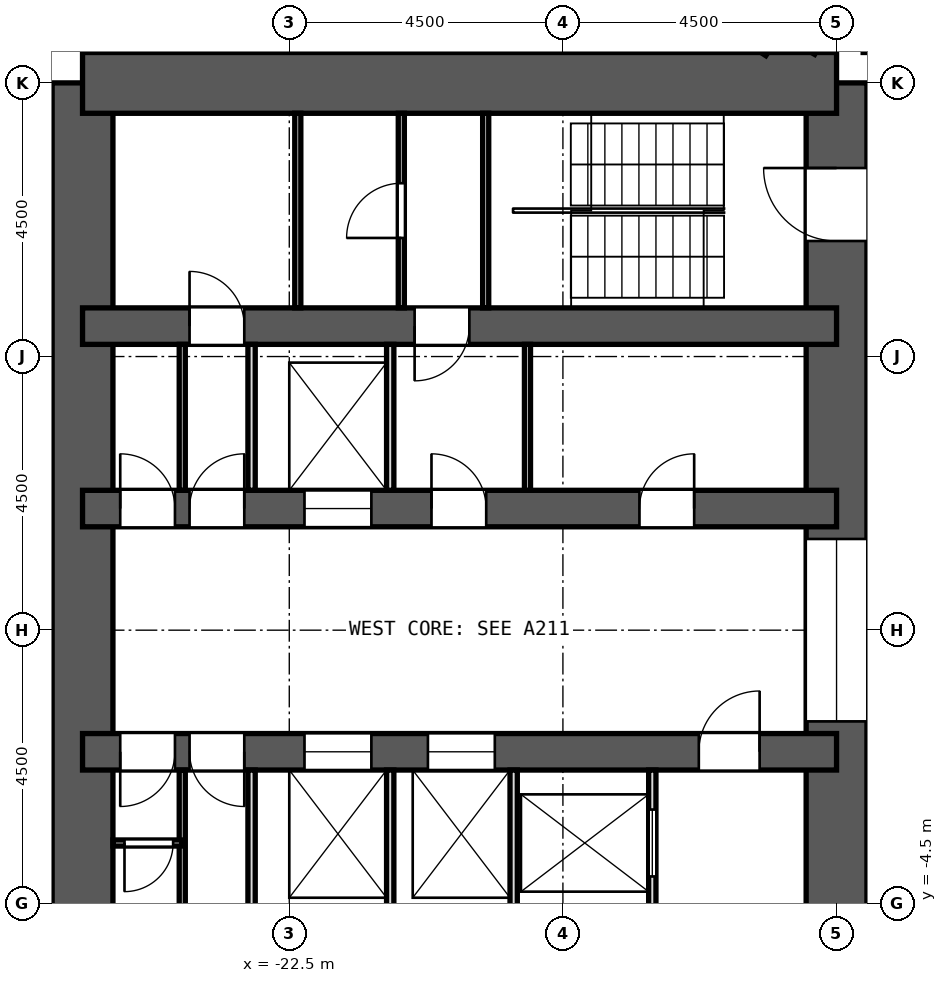
"""IFC4 building model, lengths in metres.
Left out: names, types, materials, properties, quantities, classifications, styles, units other than length and angle.
Written with IfcOpenShell. Run it as: python <this file> out.ifc"""

import sys

from ifc_helpers import new_model, si_unit, direction, frame, frame_2d, origin, place, context, subcontext, project, spatial, rectangle, extrude, element, fill, save


model = new_model("IFC4")
c1 = context("Model", 3, precision=1e-05, world=origin(), true_north=direction((0.0, 1.0)))
c2 = subcontext(c1, "Body", "Model", "MODEL_VIEW")
j1 = project(units=[si_unit("LENGTHUNIT", "METRE"), si_unit("PLANEANGLEUNIT", "RADIAN")], contexts=[c1])
p1 = place(None, origin())
s1 = spatial("IfcSite", under=j1, at=p1, CompositionType="ELEMENT")
p2 = place(p1, origin())
s2 = spatial("IfcBuilding", under=s1, at=p2, CompositionType="ELEMENT")
p3 = place(p2, frame((0.0, 0.0, 46.1)))
s3 = spatial("IfcBuildingStorey", under=s2, at=p3, CompositionType="ELEMENT", Elevation=46.1)
p4 = place(p3, frame((-13.5, -9.0, 0.0), z_axis=(0.0, 0.0, 1.0), x_axis=(0.0, 1.0, 0.0)))
e1 = element("IfcWall", 1, at=p4, inside=s3, PredefinedType="SHEAR", context=c2, shape_type="SweptSolid", body=[
    extrude(rectangle(XDim=18.0, YDim=1.0, at=frame_2d((9.0, 0.0))), origin(), (0.0, 0.0, 1.0), 3.3),
])
p5 = place(p4, frame((15.4, 0.0, 0.0)))
e2 = element("IfcOpeningElement", 2, at=p5, cuts=e1, PredefinedType="OPENING", context=c2, shape_type="SweptSolid", body=[
    extrude(rectangle(XDim=1.2, YDim=2.1, at=frame_2d((0.6, 1.05))), frame((0.0, 0.512, 0.0), z_axis=(0.0, -1.0, 0.0), x_axis=(1.0, 0.0, 0.0)), (0.0, 0.0, 1.0), 1.024),
])
p6 = place(p4, frame((1.4, 0.0, 0.0)))
e3 = element("IfcOpeningElement", 3, at=p6, cuts=e1, PredefinedType="OPENING", context=c2, shape_type="SweptSolid", body=[
    extrude(rectangle(XDim=1.2, YDim=2.1, at=frame_2d((0.6, 1.05))), frame((0.0, 0.512, 0.0), z_axis=(0.0, -1.0, 0.0), x_axis=(1.0, 0.0, 0.0)), (0.0, 0.0, 1.0), 1.024),
])
p7 = place(p4, frame((7.5, 0.0, 0.0)))
e4 = element("IfcOpeningElement", 4, at=p7, cuts=e1, PredefinedType="OPENING", context=c2, shape_type="SweptSolid", body=[
    extrude(rectangle(XDim=3.0, YDim=2.4, at=frame_2d((1.5, 1.2))), frame((0.0, 0.512, 0.0), z_axis=(0.0, -1.0, 0.0), x_axis=(1.0, 0.0, 0.0)), (0.0, 0.0, 1.0), 1.024),
])
p8 = place(p3, frame((-25.9, -9.0, 0.0), z_axis=(0.0, 0.0, 1.0), x_axis=(0.0, 1.0, 0.0)))
e5 = element("IfcWall", 5, at=p8, inside=s3, PredefinedType="SHEAR", context=c2, shape_type="SweptSolid", body=[
    extrude(rectangle(XDim=18.0, YDim=1.0, at=frame_2d((9.0, 0.0))), origin(), (0.0, 0.0, 1.0), 3.3),
])
p9 = place(p3, frame((-13.5, 9.0, 0.0), z_axis=(0.0, 0.0, 1.0), x_axis=(-1.0, 0.0, 0.0)))
e6 = element("IfcWall", 6, at=p9, inside=s3, PredefinedType="SHEAR", context=c2, shape_type="SweptSolid", body=[
    extrude(rectangle(XDim=12.4, YDim=1.0, at=frame_2d((6.2, 0.0))), origin(), (0.0, 0.0, 1.0), 3.3),
])
p10 = place(p3, frame((-13.5, 5.0, 0.0), z_axis=(0.0, 0.0, 1.0), x_axis=(-1.0, 0.0, 0.0)))
e7 = element("IfcWall", 7, at=p10, inside=s3, PredefinedType="SHEAR", context=c2, shape_type="SweptSolid", body=[
    extrude(rectangle(XDim=12.4, YDim=0.6, at=frame_2d((6.2, 0.0))), origin(), (0.0, 0.0, 1.0), 3.3),
])
p11 = place(p10, frame((6.039, 0.0, 0.0)))
e8 = element("IfcOpeningElement", 8, at=p11, cuts=e7, PredefinedType="OPENING", context=c2, shape_type="SweptSolid", body=[
    extrude(rectangle(XDim=0.9, YDim=2.1, at=frame_2d((0.45, 1.05))), frame((0.0, 0.312, 0.0), z_axis=(0.0, -1.0, 0.0), x_axis=(1.0, 0.0, 0.0)), (0.0, 0.0, 1.0), 0.624),
])
p12 = place(p10, frame((9.74, 0.0, 0.0)))
e9 = element("IfcOpeningElement", 9, at=p12, cuts=e7, PredefinedType="OPENING", context=c2, shape_type="SweptSolid", body=[
    extrude(rectangle(XDim=0.9, YDim=2.1, at=frame_2d((0.45, 1.05))), frame((0.0, 0.312, 0.0), z_axis=(0.0, -1.0, 0.0), x_axis=(1.0, 0.0, 0.0)), (0.0, 0.0, 1.0), 0.624),
])
p13 = place(p3, frame((-13.5, 2.0, 0.0), z_axis=(0.0, 0.0, 1.0), x_axis=(-1.0, 0.0, 0.0)))
e10 = element("IfcWall", 10, at=p13, inside=s3, PredefinedType="SHEAR", context=c2, shape_type="SweptSolid", body=[
    extrude(rectangle(XDim=12.4, YDim=0.6, at=frame_2d((6.2, 0.0))), origin(), (0.0, 0.0, 1.0), 3.3),
])
p14 = place(p13, frame((7.65, 0.0, 0.0)))
e11 = element("IfcOpeningElement", 11, at=p14, cuts=e10, PredefinedType="OPENING", context=c2, shape_type="SweptSolid", body=[
    extrude(rectangle(XDim=1.1, YDim=2.1, at=frame_2d((0.55, 1.05))), frame((0.0, 0.312, 0.0), z_axis=(0.0, -1.0, 0.0), x_axis=(1.0, 0.0, 0.0)), (0.0, 0.0, 1.0), 0.624),
])
p15 = place(p13, frame((2.341, 0.0, 0.0)))
e12 = element("IfcOpeningElement", 12, at=p15, cuts=e10, PredefinedType="OPENING", context=c2, shape_type="SweptSolid", body=[
    extrude(rectangle(XDim=0.9, YDim=2.1, at=frame_2d((0.45, 1.05))), frame((0.0, 0.312, 0.0), z_axis=(0.0, -1.0, 0.0), x_axis=(1.0, 0.0, 0.0)), (0.0, 0.0, 1.0), 0.624),
])
p16 = place(p13, frame((5.761, 0.0, 0.0)))
e13 = element("IfcOpeningElement", 13, at=p16, cuts=e10, PredefinedType="OPENING", context=c2, shape_type="SweptSolid", body=[
    extrude(rectangle(XDim=0.9, YDim=2.1, at=frame_2d((0.45, 1.05))), frame((0.0, 0.312, 0.0), z_axis=(0.0, -1.0, 0.0), x_axis=(1.0, 0.0, 0.0)), (0.0, 0.0, 1.0), 0.624),
])
p17 = place(p13, frame((9.74, 0.0, 0.0)))
e14 = element("IfcOpeningElement", 14, at=p17, cuts=e10, PredefinedType="OPENING", context=c2, shape_type="SweptSolid", body=[
    extrude(rectangle(XDim=0.9, YDim=2.1, at=frame_2d((0.45, 1.05))), frame((0.0, 0.312, 0.0), z_axis=(0.0, -1.0, 0.0), x_axis=(1.0, 0.0, 0.0)), (0.0, 0.0, 1.0), 0.624),
])
p18 = place(p13, frame((10.88, 0.0, 0.0)))
e15 = element("IfcOpeningElement", 15, at=p18, cuts=e10, PredefinedType="OPENING", context=c2, shape_type="SweptSolid", body=[
    extrude(rectangle(XDim=0.9, YDim=2.1, at=frame_2d((0.45, 1.05))), frame((0.0, 0.312, 0.0), z_axis=(0.0, -1.0, 0.0), x_axis=(1.0, 0.0, 0.0)), (0.0, 0.0, 1.0), 0.624),
])
p19 = place(p3, frame((-13.5, -2.0, 0.0), z_axis=(0.0, 0.0, 1.0), x_axis=(-1.0, 0.0, 0.0)))
e16 = element("IfcWall", 16, at=p19, inside=s3, PredefinedType="SHEAR", context=c2, shape_type="SweptSolid", body=[
    extrude(rectangle(XDim=12.4, YDim=0.6, at=frame_2d((6.2, 0.0))), origin(), (0.0, 0.0, 1.0), 3.3),
])
p20 = place(p19, frame((5.62, 0.0, 0.0)))
e17 = element("IfcOpeningElement", 17, at=p20, cuts=e16, PredefinedType="OPENING", context=c2, shape_type="SweptSolid", body=[
    extrude(rectangle(XDim=1.1, YDim=2.1, at=frame_2d((0.55, 1.05))), frame((0.0, 0.312, 0.0), z_axis=(0.0, -1.0, 0.0), x_axis=(1.0, 0.0, 0.0)), (0.0, 0.0, 1.0), 0.624),
])
p21 = place(p19, frame((7.65, 0.0, 0.0)))
e18 = element("IfcOpeningElement", 18, at=p21, cuts=e16, PredefinedType="OPENING", context=c2, shape_type="SweptSolid", body=[
    extrude(rectangle(XDim=1.1, YDim=2.1, at=frame_2d((0.55, 1.05))), frame((0.0, 0.312, 0.0), z_axis=(0.0, -1.0, 0.0), x_axis=(1.0, 0.0, 0.0)), (0.0, 0.0, 1.0), 0.624),
])
p22 = place(p19, frame((1.265, 0.0, 0.0)))
e19 = element("IfcOpeningElement", 19, at=p22, cuts=e16, PredefinedType="OPENING", context=c2, shape_type="SweptSolid", body=[
    extrude(rectangle(XDim=1.0, YDim=2.1, at=frame_2d((0.5, 1.05))), frame((0.0, 0.312, 0.0), z_axis=(0.0, -1.0, 0.0), x_axis=(1.0, 0.0, 0.0)), (0.0, 0.0, 1.0), 0.624),
])
p23 = place(p19, frame((9.74, 0.0, 0.0)))
e20 = element("IfcOpeningElement", 20, at=p23, cuts=e16, PredefinedType="OPENING", context=c2, shape_type="SweptSolid", body=[
    extrude(rectangle(XDim=0.9, YDim=2.1, at=frame_2d((0.45, 1.05))), frame((0.0, 0.312, 0.0), z_axis=(0.0, -1.0, 0.0), x_axis=(1.0, 0.0, 0.0)), (0.0, 0.0, 1.0), 0.624),
])
p24 = place(p19, frame((10.88, 0.0, 0.0)))
e21 = element("IfcOpeningElement", 21, at=p24, cuts=e16, PredefinedType="OPENING", context=c2, shape_type="SweptSolid", body=[
    extrude(rectangle(XDim=0.9, YDim=2.1, at=frame_2d((0.45, 1.05))), frame((0.0, 0.312, 0.0), z_axis=(0.0, -1.0, 0.0), x_axis=(1.0, 0.0, 0.0)), (0.0, 0.0, 1.0), 0.624),
])
p25 = place(p3, frame((-26.208, 11.585, 0.0), z_axis=(0.0, 0.0, 1.0), x_axis=(-0.342028474173, -0.939689588564, 0.0)))
e22 = element("IfcWall", 22, at=p25, inside=s3, PredefinedType="SOLIDWALL", context=c2, shape_type="SweptSolid", body=[
    extrude(rectangle(XDim=3.846, YDim=0.6, at=frame_2d((1.923, 0.0))), origin(), (0.0, 0.0, 1.0), 2.75),
])
p26 = place(p3, frame((-15.957, 10.362, 0.0), z_axis=(0.0, 0.0, 1.0), x_axis=(0.838795721465, -0.544446267002, 0.0)))
e23 = element("IfcWall", 23, at=p26, inside=s3, PredefinedType="PARTITIONING", context=c2, shape_type="SweptSolid", body=[
    extrude(rectangle(XDim=1.583, YDim=0.125, at=frame_2d((0.792, 0.0))), origin(), (0.0, 0.0, 1.0), 2.75),
])
p27 = place(p3, frame((-13.914, 9.5, 0.0), z_axis=(0.0, 0.0, 1.0), x_axis=(0.500066958712, 0.865986741702, 0.0)))
e24 = element("IfcWall", 24, at=p27, inside=s3, PredefinedType="PARTITIONING", context=c2, shape_type="SweptSolid", body=[
    extrude(rectangle(XDim=1.738, YDim=0.125, at=frame_2d((0.869, 0.0))), origin(), (0.0, 0.0, 1.0), 2.75),
])
p28 = place(p3, frame((-18.583, 2.3, 0.0), z_axis=(0.0, 0.0, 1.0), x_axis=(0.0, 1.0, 0.0)))
e25 = element("IfcWall", 25, at=p28, inside=s3, PredefinedType="PARTITIONING", context=c2, shape_type="SweptSolid", body=[
    extrude(rectangle(XDim=2.4, YDim=0.1, at=frame_2d((1.2, 0.0))), origin(), (0.0, 0.0, 1.0), 2.75),
])
for number, where, z_axis, x_axis in (
    (26, (-20.84, 2.3, 0.0), (0.0, 0.0, 1.0), (0.0, 1.0, 0.0)),
    (27, (-23.12, 2.3, 0.0), (0.0, 0.0, 1.0), (0.0, 1.0, 0.0)),
):
    element("IfcWall", number, at=place(p3, frame(where, z_axis=z_axis, x_axis=x_axis)), inside=s3, PredefinedType="PARTITIONING", context=c2, shape_type="SweptSolid", body=[
        extrude(rectangle(XDim=2.4, YDim=0.12, at=frame_2d((1.2, 0.0))), origin(), (0.0, 0.0, 1.0), 2.75),
    ])
p29 = place(p3, frame((-24.26, 2.3, 0.0), z_axis=(0.0, 0.0, 1.0), x_axis=(0.0, 1.0, 0.0)))
e28 = element("IfcWall", 28, at=p29, inside=s3, PredefinedType="PARTITIONING", context=c2, shape_type="SweptSolid", body=[
    extrude(rectangle(XDim=2.4, YDim=0.1, at=frame_2d((1.2, 0.0))), origin(), (0.0, 0.0, 1.0), 2.75),
])
p30 = place(p3, frame((-16.53, -4.7, 0.0), z_axis=(0.0, 0.0, 1.0), x_axis=(0.0, 1.0, 0.0)))
e29 = element("IfcWall", 29, at=p30, inside=s3, PredefinedType="PARTITIONING", context=c2, shape_type="SweptSolid", body=[
    extrude(rectangle(XDim=2.4, YDim=0.12, at=frame_2d((1.2, 0.0))), origin(), (0.0, 0.0, 1.0), 2.75),
])
p31 = place(p30, frame((0.65, 0.0, 0.0)))
e30 = element("IfcOpeningElement", 30, at=p31, cuts=e29, PredefinedType="OPENING", context=c2, shape_type="SweptSolid", body=[
    extrude(rectangle(XDim=1.1, YDim=2.1, at=frame_2d((0.55, 1.05))), frame((0.0, 0.072, 0.0), z_axis=(0.0, -1.0, 0.0), x_axis=(1.0, 0.0, 0.0)), (0.0, 0.0, 1.0), 0.144),
])
for number, where, z_axis, x_axis in (
    (31, (-18.81, -4.7, 0.0), (0.0, 0.0, 1.0), (0.0, 1.0, 0.0)),
    (32, (-20.84, -4.7, 0.0), (0.0, 0.0, 1.0), (0.0, 1.0, 0.0)),
    (33, (-23.12, -4.7, 0.0), (0.0, 0.0, 1.0), (0.0, 1.0, 0.0)),
):
    element("IfcWall", number, at=place(p3, frame(where, z_axis=z_axis, x_axis=x_axis)), inside=s3, PredefinedType="PARTITIONING", context=c2, shape_type="SweptSolid", body=[
        extrude(rectangle(XDim=2.4, YDim=0.12, at=frame_2d((1.2, 0.0))), origin(), (0.0, 0.0, 1.0), 2.75),
    ])
p32 = place(p3, frame((-24.26, -4.7, 0.0), z_axis=(0.0, 0.0, 1.0), x_axis=(0.0, 1.0, 0.0)))
e34 = element("IfcWall", 34, at=p32, inside=s3, PredefinedType="PARTITIONING", context=c2, shape_type="SweptSolid", body=[
    extrude(rectangle(XDim=2.4, YDim=0.1, at=frame_2d((1.2, 0.0))), origin(), (0.0, 0.0, 1.0), 2.75),
])
p33 = place(p3, frame((-24.26, -3.5, 0.0), z_axis=(0.0, 0.0, 1.0), x_axis=(-1.0, 0.0, 0.0)))
e35 = element("IfcWall", 35, at=p33, inside=s3, PredefinedType="PARTITIONING", context=c2, shape_type="SweptSolid", body=[
    extrude(rectangle(XDim=1.14, YDim=0.1, at=frame_2d((0.57, 0.0))), origin(), (0.0, 0.0, 1.0), 2.75),
])
p34 = place(p33, frame((0.15, 0.0, 0.0)))
e36 = element("IfcOpeningElement", 36, at=p34, cuts=e35, PredefinedType="OPENING", context=c2, shape_type="SweptSolid", body=[
    extrude(rectangle(XDim=0.8, YDim=2.1, at=frame_2d((0.4, 1.05))), frame((0.0, 0.062, 0.0), z_axis=(0.0, -1.0, 0.0), x_axis=(1.0, 0.0, 0.0)), (0.0, 0.0, 1.0), 0.124),
])
p35 = place(p3, frame((-19.27, 5.3, 0.0), z_axis=(0.0, 0.0, 1.0), x_axis=(0.0, 1.0, 0.0)))
e37 = element("IfcWall", 37, at=p35, inside=s3, PredefinedType="PARTITIONING", context=c2, shape_type="SweptSolid", body=[
    extrude(rectangle(XDim=3.2, YDim=0.1, at=frame_2d((1.6, 0.0))), origin(), (0.0, 0.0, 1.0), 2.75),
])
p36 = place(p3, frame((-20.658, 5.3, 0.0), z_axis=(0.0, 0.0, 1.0), x_axis=(0.0, 1.0, 0.0)))
e38 = element("IfcWall", 38, at=p36, inside=s3, PredefinedType="PARTITIONING", context=c2, shape_type="SweptSolid", body=[
    extrude(rectangle(XDim=3.2, YDim=0.1, at=frame_2d((1.6, 0.0))), origin(), (0.0, 0.0, 1.0), 2.75),
])
p37 = place(p36, frame((1.15, 0.0, 0.0)))
e39 = element("IfcOpeningElement", 39, at=p37, cuts=e38, PredefinedType="OPENING", context=c2, shape_type="SweptSolid", body=[
    extrude(rectangle(XDim=0.9, YDim=2.1, at=frame_2d((0.45, 1.05))), frame((0.0, 0.062, 0.0), z_axis=(0.0, -1.0, 0.0), x_axis=(1.0, 0.0, 0.0)), (0.0, 0.0, 1.0), 0.124),
])
p38 = place(p3, frame((-22.36, 5.3, 0.0), z_axis=(0.0, 0.0, 1.0), x_axis=(0.0, 1.0, 0.0)))
e40 = element("IfcWall", 40, at=p38, inside=s3, PredefinedType="PARTITIONING", context=c2, shape_type="SweptSolid", body=[
    extrude(rectangle(XDim=3.2, YDim=0.1, at=frame_2d((1.6, 0.0))), origin(), (0.0, 0.0, 1.0), 2.75),
])
p39 = place(p14, origin())
e41 = element("IfcDoor", 41, at=p39, inside=s3, OperationType="DOUBLE_DOOR_SLIDING", PredefinedType="DOOR", context=c2, shape_type="SweptSolid", body=[
    extrude(rectangle(XDim=1.1, YDim=2.1, at=frame_2d((0.55, 1.05))), frame((0.0, 0.025, 0.0), z_axis=(0.0, -1.0, 0.0), x_axis=(1.0, 0.0, 0.0)), (0.0, 0.0, 1.0), 0.05),
])
fill(e11, e41)
p40 = place(p31, origin())
e42 = element("IfcDoor", 42, at=p40, inside=s3, OperationType="DOUBLE_DOOR_SLIDING", PredefinedType="DOOR", context=c2, shape_type="SweptSolid", body=[
    extrude(rectangle(XDim=1.1, YDim=2.1, at=frame_2d((0.55, 1.05))), frame((0.0, 0.025, 0.0), z_axis=(0.0, -1.0, 0.0), x_axis=(1.0, 0.0, 0.0)), (0.0, 0.0, 1.0), 0.05),
])
fill(e30, e42)
p41 = place(p20, origin())
e43 = element("IfcDoor", 43, at=p41, inside=s3, OperationType="DOUBLE_DOOR_SLIDING", PredefinedType="DOOR", context=c2, shape_type="SweptSolid", body=[
    extrude(rectangle(XDim=1.1, YDim=2.1, at=frame_2d((0.55, 1.05))), frame((0.0, 0.025, 0.0), z_axis=(0.0, -1.0, 0.0), x_axis=(1.0, 0.0, 0.0)), (0.0, 0.0, 1.0), 0.05),
])
fill(e17, e43)
p42 = place(p21, origin())
e44 = element("IfcDoor", 44, at=p42, inside=s3, OperationType="DOUBLE_DOOR_SLIDING", PredefinedType="DOOR", context=c2, shape_type="SweptSolid", body=[
    extrude(rectangle(XDim=1.1, YDim=2.1, at=frame_2d((0.55, 1.05))), frame((0.0, 0.025, 0.0), z_axis=(0.0, -1.0, 0.0), x_axis=(1.0, 0.0, 0.0)), (0.0, 0.0, 1.0), 0.05),
])
fill(e18, e44)
p43 = place(p15, frame((0.9, 0.0, 0.0), z_axis=(0.0, 0.0, 1.0), x_axis=(-1.0, 0.0, 0.0)))
e45 = element("IfcDoor", 45, at=p43, inside=s3, OperationType="SINGLE_SWING_RIGHT", PredefinedType="DOOR", context=c2, shape_type="SweptSolid", body=[
    extrude(rectangle(XDim=0.9, YDim=2.1, at=frame_2d((0.45, 1.05))), frame((0.0, 0.025, 0.0), z_axis=(0.0, -1.0, 0.0), x_axis=(1.0, 0.0, 0.0)), (0.0, 0.0, 1.0), 0.05),
])
fill(e12, e45)
p44 = place(p16, frame((0.9, 0.0, 0.0), z_axis=(0.0, 0.0, 1.0), x_axis=(-1.0, 0.0, 0.0)))
e46 = element("IfcDoor", 46, at=p44, inside=s3, OperationType="SINGLE_SWING_LEFT", PredefinedType="DOOR", context=c2, shape_type="SweptSolid", body=[
    extrude(rectangle(XDim=0.9, YDim=2.1, at=frame_2d((0.45, 1.05))), frame((0.0, 0.025, 0.0), z_axis=(0.0, -1.0, 0.0), x_axis=(1.0, 0.0, 0.0)), (0.0, 0.0, 1.0), 0.05),
])
fill(e13, e46)
p45 = place(p17, frame((0.9, 0.0, 0.0), z_axis=(0.0, 0.0, 1.0), x_axis=(-1.0, 0.0, 0.0)))
e47 = element("IfcDoor", 47, at=p45, inside=s3, OperationType="SINGLE_SWING_RIGHT", PredefinedType="DOOR", context=c2, shape_type="SweptSolid", body=[
    extrude(rectangle(XDim=0.9, YDim=2.1, at=frame_2d((0.45, 1.05))), frame((0.0, 0.025, 0.0), z_axis=(0.0, -1.0, 0.0), x_axis=(1.0, 0.0, 0.0)), (0.0, 0.0, 1.0), 0.05),
])
fill(e14, e47)
p46 = place(p18, frame((0.9, 0.0, 0.0), z_axis=(0.0, 0.0, 1.0), x_axis=(-1.0, 0.0, 0.0)))
e48 = element("IfcDoor", 48, at=p46, inside=s3, OperationType="SINGLE_SWING_LEFT", PredefinedType="DOOR", context=c2, shape_type="SweptSolid", body=[
    extrude(rectangle(XDim=0.9, YDim=2.1, at=frame_2d((0.45, 1.05))), frame((0.0, 0.025, 0.0), z_axis=(0.0, -1.0, 0.0), x_axis=(1.0, 0.0, 0.0)), (0.0, 0.0, 1.0), 0.05),
])
fill(e15, e48)
p47 = place(p22, frame((1.0, 0.0, 0.0), z_axis=(0.0, 0.0, 1.0), x_axis=(-1.0, 0.0, 0.0)))
e49 = element("IfcDoor", 49, at=p47, inside=s3, OperationType="SINGLE_SWING_RIGHT", PredefinedType="DOOR", context=c2, shape_type="SweptSolid", body=[
    extrude(rectangle(XDim=1.0, YDim=2.1, at=frame_2d((0.5, 1.05))), frame((0.0, 0.025, 0.0), z_axis=(0.0, -1.0, 0.0), x_axis=(1.0, 0.0, 0.0)), (0.0, 0.0, 1.0), 0.05),
])
fill(e19, e49)
p48 = place(p23, origin())
e50 = element("IfcDoor", 50, at=p48, inside=s3, OperationType="SINGLE_SWING_LEFT", PredefinedType="DOOR", context=c2, shape_type="SweptSolid", body=[
    extrude(rectangle(XDim=0.9, YDim=2.1, at=frame_2d((0.45, 1.05))), frame((0.0, 0.025, 0.0), z_axis=(0.0, -1.0, 0.0), x_axis=(1.0, 0.0, 0.0)), (0.0, 0.0, 1.0), 0.05),
])
fill(e20, e50)
p49 = place(p24, origin())
e51 = element("IfcDoor", 51, at=p49, inside=s3, OperationType="SINGLE_SWING_RIGHT", PredefinedType="DOOR", context=c2, shape_type="SweptSolid", body=[
    extrude(rectangle(XDim=0.9, YDim=2.1, at=frame_2d((0.45, 1.05))), frame((0.0, 0.025, 0.0), z_axis=(0.0, -1.0, 0.0), x_axis=(1.0, 0.0, 0.0)), (0.0, 0.0, 1.0), 0.05),
])
fill(e21, e51)
p50 = place(p37, origin())
e52 = element("IfcDoor", 52, at=p50, inside=s3, OperationType="SINGLE_SWING_LEFT", PredefinedType="DOOR", context=c2, shape_type="SweptSolid", body=[
    extrude(rectangle(XDim=0.9, YDim=2.1, at=frame_2d((0.45, 1.05))), frame((0.0, 0.025, 0.0), z_axis=(0.0, -1.0, 0.0), x_axis=(1.0, 0.0, 0.0)), (0.0, 0.0, 1.0), 0.05),
])
fill(e39, e52)
p51 = place(p11, origin())
e53 = element("IfcDoor", 53, at=p51, inside=s3, OperationType="SINGLE_SWING_RIGHT", PredefinedType="DOOR", context=c2, shape_type="SweptSolid", body=[
    extrude(rectangle(XDim=0.9, YDim=2.1, at=frame_2d((0.45, 1.05))), frame((0.0, 0.025, 0.0), z_axis=(0.0, -1.0, 0.0), x_axis=(1.0, 0.0, 0.0)), (0.0, 0.0, 1.0), 0.05),
])
fill(e8, e53)
p52 = place(p12, frame((0.9, 0.0, 0.0), z_axis=(0.0, 0.0, 1.0), x_axis=(-1.0, 0.0, 0.0)))
e54 = element("IfcDoor", 54, at=p52, inside=s3, OperationType="SINGLE_SWING_LEFT", PredefinedType="DOOR", context=c2, shape_type="SweptSolid", body=[
    extrude(rectangle(XDim=0.9, YDim=2.1, at=frame_2d((0.45, 1.05))), frame((0.0, 0.025, 0.0), z_axis=(0.0, -1.0, 0.0), x_axis=(1.0, 0.0, 0.0)), (0.0, 0.0, 1.0), 0.05),
])
fill(e9, e54)
p53 = place(p34, origin())
e55 = element("IfcDoor", 55, at=p53, inside=s3, OperationType="SINGLE_SWING_RIGHT", PredefinedType="DOOR", context=c2, shape_type="SweptSolid", body=[
    extrude(rectangle(XDim=0.8, YDim=2.1, at=frame_2d((0.4, 1.05))), frame((0.0, 0.025, 0.0), z_axis=(0.0, -1.0, 0.0), x_axis=(1.0, 0.0, 0.0)), (0.0, 0.0, 1.0), 0.05),
])
fill(e36, e55)
p54 = place(p5, origin())
e56 = element("IfcDoor", 56, at=p54, inside=s3, OperationType="SINGLE_SWING_RIGHT", PredefinedType="DOOR", context=c2, shape_type="SweptSolid", body=[
    extrude(rectangle(XDim=1.2, YDim=2.1, at=frame_2d((0.6, 1.05))), frame((0.0, 0.025, 0.0), z_axis=(0.0, -1.0, 0.0), x_axis=(1.0, 0.0, 0.0)), (0.0, 0.0, 1.0), 0.05),
])
fill(e2, e56)
p55 = place(p7, origin())
e57 = element("IfcDoor", 57, at=p55, inside=s3, OperationType="DOUBLE_DOOR_SLIDING", PredefinedType="DOOR", context=c2, shape_type="SweptSolid", body=[
    extrude(rectangle(XDim=3.0, YDim=2.4, at=frame_2d((1.5, 1.2))), frame((0.0, 0.025, 0.0), z_axis=(0.0, -1.0, 0.0), x_axis=(1.0, 0.0, 0.0)), (0.0, 0.0, 1.0), 0.05),
])
fill(e4, e57)
save(model, sys.argv[1])
